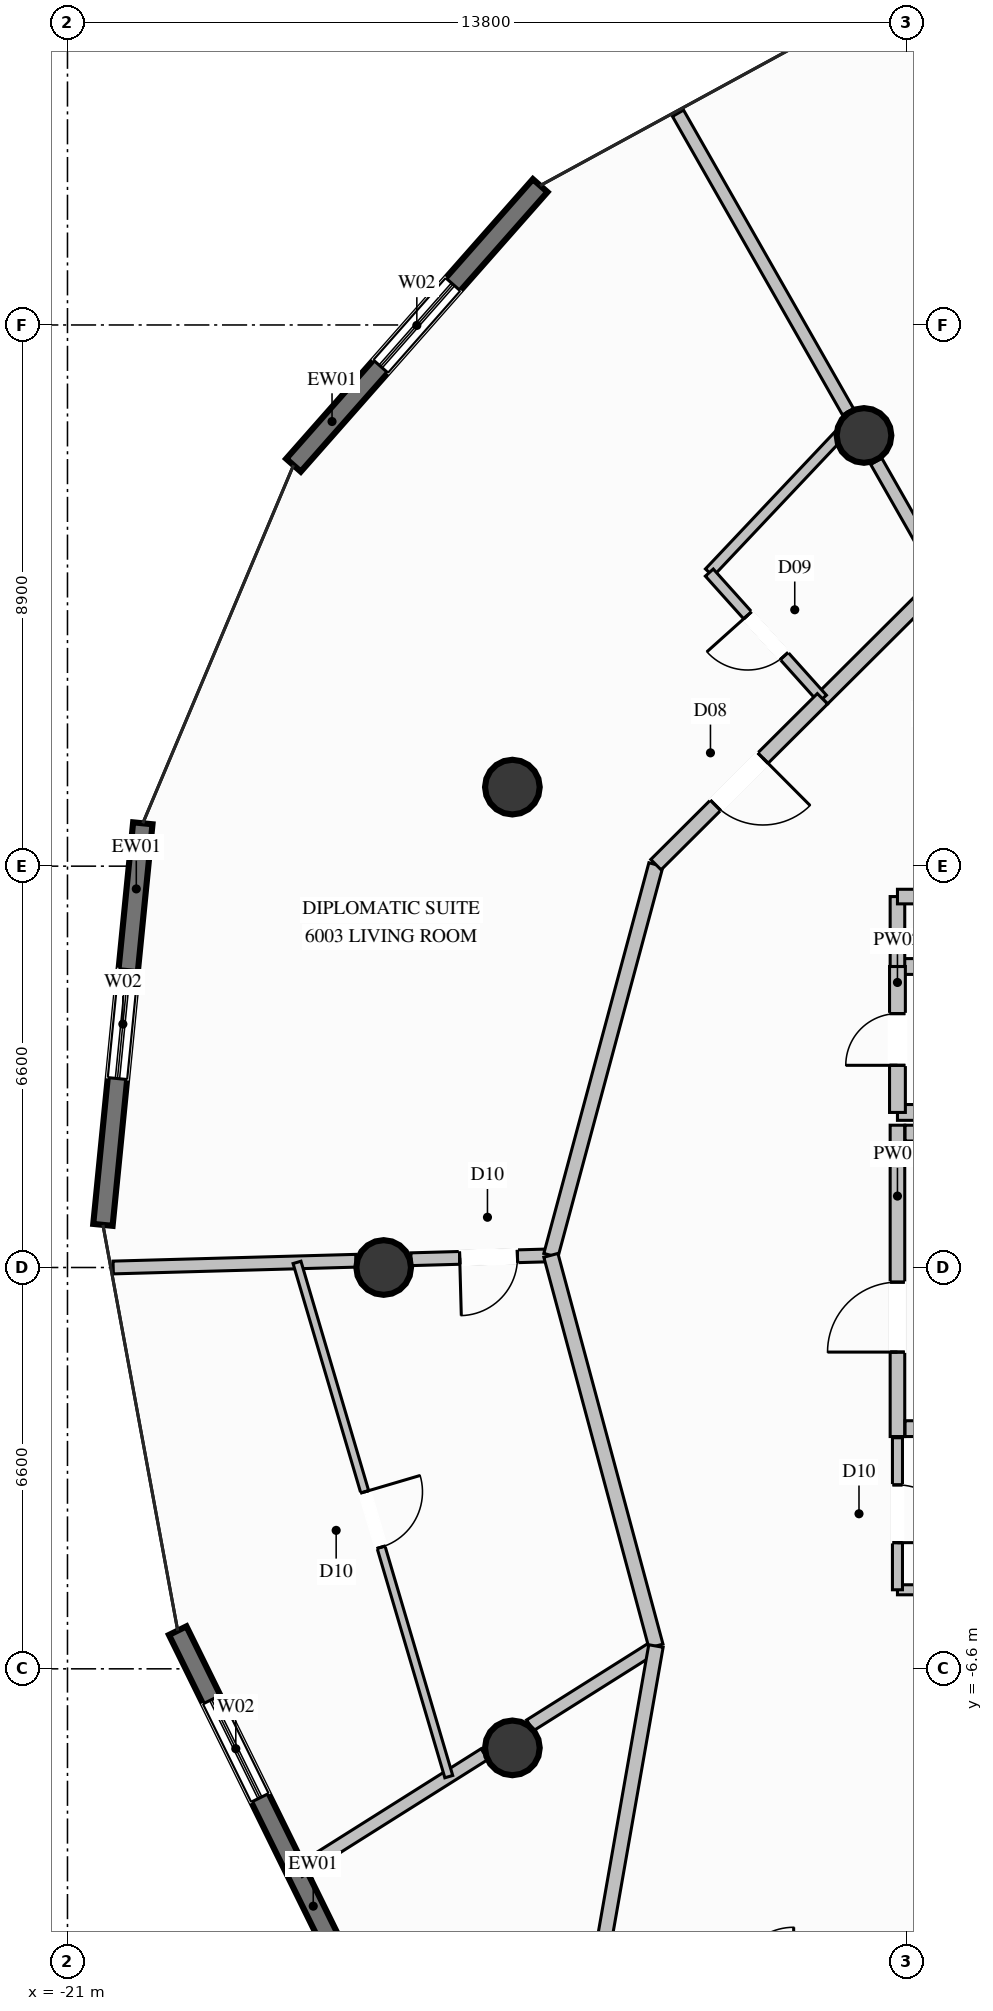
"""IFC4 building model, lengths in metres.
Left out: names, types, materials, properties, quantities, classifications, styles, units other than length and angle.
Written with IfcOpenShell. Run it as: python <this file> out.ifc"""

import sys

from ifc_helpers import new_model, si_unit, direction, frame, frame_2d, origin, origin_2d, place, context, subcontext, project, spatial, rectangle, circle, extrude, element, fill, save


model = new_model("IFC4")
c1 = context("Model", 3, precision=1e-05, world=origin(), true_north=direction((0.0, 1.0)))
c2 = subcontext(c1, "Body", "Model", "MODEL_VIEW")
j1 = project(units=[si_unit("LENGTHUNIT", "METRE"), si_unit("PLANEANGLEUNIT", "RADIAN")], contexts=[c1])
p1 = place(None, origin())
s1 = spatial("IfcSite", under=j1, at=p1, CompositionType="ELEMENT")
p2 = place(p1, origin())
s2 = spatial("IfcBuilding", under=s1, at=p2, CompositionType="ELEMENT")
p3 = place(p2, frame((0.0, 0.0, 223.6)))
s3 = spatial("IfcBuildingStorey", under=s2, at=p3, CompositionType="ELEMENT", Elevation=223.6)
for number, where, z_axis, x_axis in (
    (1, (-7.9, 13.683, 0.0), (0.0, 0.0, 1.0), (1.0, 0.0, 0.0)),
    (2, (-13.683, 7.9, 0.0), (0.0, 0.0, 1.0), (1.0, 0.0, 0.0)),
    (3, (-15.8, 0.0, 0.0), (0.0, 0.0, 1.0), (1.0, 0.0, 0.0)),
    (4, (-13.683, -7.9, 0.0), (0.0, 0.0, 1.0), (1.0, 0.0, 0.0)),
):
    element("IfcColumn", number, at=place(p3, frame(where, z_axis=z_axis, x_axis=x_axis)), inside=s3, PredefinedType="COLUMN", context=c2, shape_type="SweptSolid", body=[
        extrude(circle(Radius=0.45, at=origin_2d()), origin(), (0.0, 0.0, 1.0), 3.6),
    ])
p4 = place(p3, frame((-17.283, 13.194, 0.0), z_axis=(0.0, 0.0, 1.0), x_axis=(0.661613735925, 0.749844826905, 0.0)))
e5 = element("IfcWall", 5, at=p4, inside=s3, PredefinedType="SOLIDWALL", context=c2, shape_type="SweptSolid", body=[
    extrude(rectangle(XDim=6.132, YDim=0.32, at=frame_2d((3.066, 0.0))), origin(), (0.0, 0.0, 1.0), 3.36),
])
p5 = place(p4, frame((2.166, 0.0, 0.35)))
e6 = element("IfcOpeningElement", 6, at=p5, cuts=e5, PredefinedType="OPENING", context=c2, shape_type="SweptSolid", body=[
    extrude(rectangle(XDim=1.8, YDim=2.6, at=frame_2d((0.9, 1.3))), frame((0.0, 0.17, 0.0), z_axis=(0.0, -1.0, 0.0), x_axis=(1.0, 0.0, 0.0)), (0.0, 0.0, 1.0), 0.34),
])
p6 = place(p3, frame((-20.417, 0.701, 0.0), z_axis=(0.0, 0.0, 1.0), x_axis=(0.098848078175, 0.995102536144, 0.0)))
e7 = element("IfcWall", 7, at=p6, inside=s3, PredefinedType="SOLIDWALL", context=c2, shape_type="SweptSolid", body=[
    extrude(rectangle(XDim=6.636, YDim=0.32, at=frame_2d((3.318, 0.0))), origin(), (0.0, 0.0, 1.0), 3.36),
])
p7 = place(p6, frame((2.418, 0.0, 0.35)))
e8 = element("IfcOpeningElement", 8, at=p7, cuts=e7, PredefinedType="OPENING", context=c2, shape_type="SweptSolid", body=[
    extrude(rectangle(XDim=1.8, YDim=2.6, at=frame_2d((0.9, 1.3))), frame((0.0, 0.17, 0.0), z_axis=(0.0, -1.0, 0.0), x_axis=(1.0, 0.0, 0.0)), (0.0, 0.0, 1.0), 0.34),
])
p8 = place(p3, frame((-16.192, -12.06, 0.0), z_axis=(0.0, 0.0, 1.0), x_axis=(-0.441432699622, 0.897294361792, 0.0)))
e9 = element("IfcWall", 9, at=p8, inside=s3, PredefinedType="SOLIDWALL", context=c2, shape_type="SweptSolid", body=[
    extrude(rectangle(XDim=6.785, YDim=0.32, at=frame_2d((3.393, 0.0))), origin(), (0.0, 0.0, 1.0), 3.36),
])
p9 = place(p8, frame((3.721, 0.0, 0.35)))
e10 = element("IfcOpeningElement", 10, at=p9, cuts=e9, PredefinedType="OPENING", context=c2, shape_type="SweptSolid", body=[
    extrude(rectangle(XDim=1.8, YDim=2.6, at=frame_2d((0.9, 1.3))), frame((0.0, 0.17, 0.0), z_axis=(0.0, -1.0, 0.0), x_axis=(1.0, 0.0, 0.0)), (0.0, 0.0, 1.0), 0.34),
])
p10 = place(p3, frame((-7.35, -2.78, 0.0), z_axis=(0.0, 0.0, 1.0), x_axis=(0.0, 1.0, 0.0)))
e11 = element("IfcWall", 11, at=p10, inside=s3, PredefinedType="PARTITIONING", context=c2, shape_type="SweptSolid", body=[
    extrude(rectangle(XDim=5.12, YDim=0.24, at=frame_2d((2.56, 0.0))), origin(), (0.0, 0.0, 1.0), 2.445),
])
p11 = place(p10, frame((1.389, 0.0, 0.0)))
e12 = element("IfcOpeningElement", 12, at=p11, cuts=e11, PredefinedType="OPENING", context=c2, shape_type="SweptSolid", body=[
    extrude(rectangle(XDim=1.15, YDim=2.2, at=frame_2d((0.575, 1.1))), frame((0.0, 0.13, 0.0), z_axis=(0.0, -1.0, 0.0), x_axis=(1.0, 0.0, 0.0)), (0.0, 0.0, 1.0), 0.26),
])
p12 = place(p3, frame((-7.225, -2.65, 0.0), z_axis=(0.0, 0.0, 1.0), x_axis=(1.0, 0.0, 0.0)))
e13 = element("IfcWall", 13, at=p12, inside=s3, PredefinedType="PARTITIONING", context=c2, shape_type="SweptSolid", body=[
    extrude(rectangle(XDim=3.095, YDim=0.26, at=frame_2d((1.548, 0.0))), origin(), (0.0, 0.0, 1.0), 3.36),
])
p13 = place(p3, frame((-7.225, 2.21, 0.0), z_axis=(0.0, 0.0, 1.0), x_axis=(1.0, 0.0, 0.0)))
e14 = element("IfcWall", 14, at=p13, inside=s3, PredefinedType="PARTITIONING", context=c2, shape_type="SweptSolid", body=[
    extrude(rectangle(XDim=0.875, YDim=0.26, at=frame_2d((0.438, 0.0))), origin(), (0.0, 0.0, 1.0), 3.36),
])
for number, where, z_axis, x_axis in (
    (15, (-7.35, 4.95, 0.0), (0.0, 0.0, 1.0), (1.0, 0.0, 0.0)),
    (16, (-7.35, 2.55, 0.0), (0.0, 0.0, 1.0), (1.0, 0.0, 0.0)),
):
    element("IfcWall", number, at=place(p3, frame(where, z_axis=z_axis, x_axis=x_axis)), inside=s3, PredefinedType="PARTITIONING", context=c2, shape_type="SweptSolid", body=[
        extrude(rectangle(XDim=0.93, YDim=0.26, at=frame_2d((0.465, 0.0))), origin(), (0.0, 0.0, 1.0), 3.36),
    ])
p14 = place(p3, frame((-7.35, 2.55, 0.0), z_axis=(0.0, 0.0, 1.0), x_axis=(0.0, 1.0, 0.0)))
e17 = element("IfcWall", 17, at=p14, inside=s3, PredefinedType="PARTITIONING", context=c2, shape_type="SweptSolid", body=[
    extrude(rectangle(XDim=2.4, YDim=0.26, at=frame_2d((1.2, 0.0))), origin(), (0.0, 0.0, 1.0), 2.445),
])
p15 = place(p14, frame((0.775, 0.0, 0.0)))
e18 = element("IfcOpeningElement", 18, at=p15, cuts=e17, PredefinedType="OPENING", context=c2, shape_type="SweptSolid", body=[
    extrude(rectangle(XDim=0.85, YDim=2.05, at=frame_2d((0.425, 1.025))), frame((0.0, 0.14, 0.0), z_axis=(0.0, -1.0, 0.0), x_axis=(1.0, 0.0, 0.0)), (0.0, 0.0, 1.0), 0.28),
])
p16 = place(p3, frame((-7.35, 4.95, 0.0), z_axis=(0.0, 0.0, 1.0), x_axis=(0.0, 1.0, 0.0)))
e19 = element("IfcWall", 19, at=p16, inside=s3, PredefinedType="PARTITIONING", context=c2, shape_type="SweptSolid", body=[
    extrude(rectangle(XDim=1.15, YDim=0.24, at=frame_2d((0.575, 0.0))), origin(), (0.0, 0.0, 1.0), 2.445),
])
p17 = place(p3, frame((-7.35, 6.1, 0.0), z_axis=(0.0, 0.0, 1.0), x_axis=(1.0, 0.0, 0.0)))
e20 = element("IfcWall", 20, at=p17, inside=s3, PredefinedType="PARTITIONING", context=c2, shape_type="SweptSolid", body=[
    extrude(rectangle(XDim=0.85, YDim=0.24, at=frame_2d((0.425, 0.0))), origin(), (0.0, 0.0, 1.0), 2.801),
])
p18 = place(p3, frame((-7.35, -5.3, 0.0), z_axis=(0.0, 0.0, 1.0), x_axis=(1.0, 0.0, 0.0)))
e21 = element("IfcWall", 21, at=p18, inside=s3, PredefinedType="PARTITIONING", context=c2, shape_type="SweptSolid", body=[
    extrude(rectangle(XDim=1.5, YDim=0.165, at=frame_2d((0.75, 0.0))), origin(), (0.0, 0.0, 1.0), 2.445),
])
p19 = place(p3, frame((-7.35, -2.8, 0.0), z_axis=(0.0, 0.0, 1.0), x_axis=(0.0, -1.0, 0.0)))
e22 = element("IfcWall", 22, at=p19, inside=s3, PredefinedType="PARTITIONING", context=c2, shape_type="SweptSolid", body=[
    extrude(rectangle(XDim=2.5, YDim=0.165, at=frame_2d((1.25, 0.0))), origin(), (0.0, 0.0, 1.0), 3.36),
])
p20 = place(p19, frame((0.775, 0.0, 0.0)))
e23 = element("IfcOpeningElement", 23, at=p20, cuts=e22, PredefinedType="OPENING", context=c2, shape_type="SweptSolid", body=[
    extrude(rectangle(XDim=0.95, YDim=2.1, at=frame_2d((0.475, 1.05))), frame((0.0, 0.093, 0.0), z_axis=(0.0, -1.0, 0.0), x_axis=(1.0, 0.0, 0.0)), (0.0, 0.0, 1.0), 0.185),
])
p21 = place(p3, frame((-6.6, 11.328, 0.0), z_axis=(0.0, 0.0, 1.0), x_axis=(-0.494753305644, 0.869033466878, 0.0)))
e24 = element("IfcWall", 24, at=p21, inside=s3, PredefinedType="PARTITIONING", context=c2, shape_type="SweptSolid", body=[
    extrude(rectangle(XDim=2.221, YDim=0.21, at=frame_2d((1.11, 0.0))), origin(), (0.0, 0.0, 1.0), 2.801),
])
p22 = place(p3, frame((-8.163, 14.073, 0.0), z_axis=(0.0, 0.0, 1.0), x_axis=(-0.494909777101, 0.868944366763, 0.0)))
e25 = element("IfcWall", 25, at=p22, inside=s3, PredefinedType="PARTITIONING", context=c2, shape_type="SweptSolid", body=[
    extrude(rectangle(XDim=5.649, YDim=0.21, at=frame_2d((2.825, 0.0))), origin(), (0.0, 0.0, 1.0), 3.36),
])
p23 = place(p3, frame((-13.05, 0.2, 0.0), z_axis=(0.0, 0.0, 1.0), x_axis=(-0.999613520241, -0.027799463146, 0.0)))
e26 = element("IfcWall", 26, at=p23, inside=s3, PredefinedType="PARTITIONING", context=c2, shape_type="SweptSolid", body=[
    extrude(rectangle(XDim=2.301, YDim=0.21, at=frame_2d((1.15, 0.0))), origin(), (0.0, 0.0, 1.0), 3.36),
])
p24 = place(p23, frame((0.55, 0.0, 0.0)))
e27 = element("IfcOpeningElement", 27, at=p24, cuts=e26, PredefinedType="OPENING", context=c2, shape_type="SweptSolid", body=[
    extrude(rectangle(XDim=0.95, YDim=2.1, at=frame_2d((0.475, 1.05))), frame((0.0, 0.115, 0.0), z_axis=(0.0, -1.0, 0.0), x_axis=(1.0, 0.0, 0.0)), (0.0, 0.0, 1.0), 0.23),
])
p25 = place(p3, frame((-16.257, 0.111, 0.0), z_axis=(0.0, 0.0, 1.0), x_axis=(-0.999612863233, -0.027823077798, 0.0)))
e28 = element("IfcWall", 28, at=p25, inside=s3, PredefinedType="PARTITIONING", context=c2, shape_type="SweptSolid", body=[
    extrude(rectangle(XDim=3.992, YDim=0.21, at=frame_2d((1.996, 0.0))), origin(), (0.0, 0.0, 1.0), 3.36),
])
p26 = place(p3, frame((-11.322, -6.225, 0.0), z_axis=(0.0, 0.0, 1.0), x_axis=(-0.846059580186, -0.533088348001, 0.0)))
e29 = element("IfcWall", 29, at=p26, inside=s3, PredefinedType="PARTITIONING", context=c2, shape_type="SweptSolid", body=[
    extrude(rectangle(XDim=2.448, YDim=0.21, at=frame_2d((1.224, 0.0))), origin(), (0.0, 0.0, 1.0), 2.801),
])
p27 = place(p3, frame((-14.142, -8.003, 0.0), z_axis=(0.0, 0.0, 1.0), x_axis=(-0.84595942636, -0.533247268115, 0.0)))
e30 = element("IfcWall", 30, at=p27, inside=s3, PredefinedType="PARTITIONING", context=c2, shape_type="SweptSolid", body=[
    extrude(rectangle(XDim=3.61, YDim=0.21, at=frame_2d((1.805, 0.0))), origin(), (0.0, 0.0, 1.0), 3.36),
])
p28 = place(p3, frame((-6.6, 11.328, 0.0), z_axis=(0.0, 0.0, 1.0), x_axis=(-0.708544738437, -0.705665893772, 0.0)))
e31 = element("IfcWall", 31, at=p28, inside=s3, PredefinedType="PARTITIONING", context=c2, shape_type="SweptSolid", body=[
    extrude(rectangle(XDim=2.799, YDim=0.24, at=frame_2d((1.399, 0.0))), origin(), (0.0, 0.0, 1.0), 3.36),
])
p29 = place(p3, frame((-8.082, 13.93, 0.0), z_axis=(0.0, 0.0, 1.0), x_axis=(-0.686486009921, -0.727143010819, 0.0)))
e32 = element("IfcWall", 32, at=p29, inside=s3, PredefinedType="PLUMBINGWALL", context=c2, shape_type="SweptSolid", body=[
    extrude(rectangle(XDim=3.441, YDim=0.175, at=frame_2d((1.72, 0.0))), origin(), (0.0, 0.0, 1.0), 2.929),
])
p30 = place(p3, frame((-8.583, 9.353, 0.0), z_axis=(0.0, 0.0, 1.0), x_axis=(-0.667700723626, 0.74442981111, 0.0)))
e33 = element("IfcWall", 33, at=p30, inside=s3, PredefinedType="PLUMBINGWALL", context=c2, shape_type="SweptSolid", body=[
    extrude(rectangle(XDim=2.787, YDim=0.175, at=frame_2d((1.394, 0.0))), origin(), (0.0, 0.0, 1.0), 3.36),
])
p31 = place(p30, frame((0.944, 0.0, 0.0)))
e34 = element("IfcOpeningElement", 34, at=p31, cuts=e33, PredefinedType="OPENING", context=c2, shape_type="SweptSolid", body=[
    extrude(rectangle(XDim=0.9, YDim=2.1, at=frame_2d((0.45, 1.05))), frame((0.0, 0.098, 0.0), z_axis=(0.0, -1.0, 0.0), x_axis=(1.0, 0.0, 0.0)), (0.0, 0.0, 1.0), 0.195),
])
p32 = place(p3, frame((-11.322, 6.625, 0.0), z_axis=(0.0, 0.0, 1.0), x_axis=(-0.259722121469, -0.965683395125, 0.0)))
e35 = element("IfcWall", 35, at=p32, inside=s3, PredefinedType="PARTITIONING", context=c2, shape_type="SweptSolid", body=[
    extrude(rectangle(XDim=6.653, YDim=0.24, at=frame_2d((3.327, 0.0))), origin(), (0.0, 0.0, 1.0), 3.36),
])
p33 = place(p3, frame((-8.583, 9.353, 0.0), z_axis=(0.0, 0.0, 1.0), x_axis=(-0.70852632163, -0.70568438523, 0.0)))
e36 = element("IfcWall", 36, at=p33, inside=s3, PredefinedType="PARTITIONING", context=c2, shape_type="SweptSolid", body=[
    extrude(rectangle(XDim=3.866, YDim=0.24, at=frame_2d((1.933, 0.0))), origin(), (0.0, 0.0, 1.0), 3.36),
])
p34 = place(p33, frame((1.383, 0.0, 0.0)))
e37 = element("IfcOpeningElement", 37, at=p34, cuts=e36, PredefinedType="OPENING", context=c2, shape_type="SweptSolid", body=[
    extrude(rectangle(XDim=1.1, YDim=2.3, at=frame_2d((0.55, 1.15))), frame((0.0, 0.13, 0.0), z_axis=(0.0, -1.0, 0.0), x_axis=(1.0, 0.0, 0.0)), (0.0, 0.0, 1.0), 0.26),
])
p35 = place(p3, frame((-13.05, 0.2, 0.0), z_axis=(0.0, 0.0, 1.0), x_axis=(0.259722121469, -0.965683395125, 0.0)))
e38 = element("IfcWall", 38, at=p35, inside=s3, PredefinedType="PARTITIONING", context=c2, shape_type="SweptSolid", body=[
    extrude(rectangle(XDim=6.653, YDim=0.24, at=frame_2d((3.327, 0.0))), origin(), (0.0, 0.0, 1.0), 3.36),
])
p36 = place(p3, frame((-17.225, 0.084, 0.0), z_axis=(0.0, 0.0, 1.0), x_axis=(0.283077593479, -0.959097010771, 0.0)))
e39 = element("IfcWall", 39, at=p36, inside=s3, PredefinedType="PARTITIONING", context=c2, shape_type="SweptSolid", body=[
    extrude(rectangle(XDim=8.818, YDim=0.135, at=frame_2d((4.409, 0.0))), origin(), (0.0, 0.0, 1.0), 3.36),
])
p37 = place(p36, frame((3.934, 0.0, 0.0)))
e40 = element("IfcOpeningElement", 40, at=p37, cuts=e39, PredefinedType="OPENING", context=c2, shape_type="SweptSolid", body=[
    extrude(rectangle(XDim=0.95, YDim=2.1, at=frame_2d((0.475, 1.05))), frame((0.0, 0.078, 0.0), z_axis=(0.0, -1.0, 0.0), x_axis=(1.0, 0.0, 0.0)), (0.0, 0.0, 1.0), 0.155),
])
p38 = place(p3, frame((-11.322, -6.225, 0.0), z_axis=(0.0, 0.0, 1.0), x_axis=(-0.172793604918, -0.984958054995, 0.0)))
e41 = element("IfcWall", 41, at=p38, inside=s3, PredefinedType="PARTITIONING", context=c2, shape_type="SweptSolid", body=[
    extrude(rectangle(XDim=5.66, YDim=0.24, at=frame_2d((2.83, 0.0))), origin(), (0.0, 0.0, 1.0), 3.36),
])
p39 = place(p5, origin())
e42 = element("IfcWindow", 42, at=p39, inside=s3, PartitioningType="SINGLE_PANEL", PredefinedType="WINDOW", context=c2, shape_type="SweptSolid", body=[
    extrude(rectangle(XDim=1.8, YDim=2.6, at=frame_2d((0.9, 1.3))), frame((0.0, 0.03, 0.0), z_axis=(0.0, -1.0, 0.0), x_axis=(1.0, 0.0, 0.0)), (0.0, 0.0, 1.0), 0.06),
])
fill(e6, e42)
p40 = place(p7, origin())
e43 = element("IfcWindow", 43, at=p40, inside=s3, PartitioningType="SINGLE_PANEL", PredefinedType="WINDOW", context=c2, shape_type="SweptSolid", body=[
    extrude(rectangle(XDim=1.8, YDim=2.6, at=frame_2d((0.9, 1.3))), frame((0.0, 0.03, 0.0), z_axis=(0.0, -1.0, 0.0), x_axis=(1.0, 0.0, 0.0)), (0.0, 0.0, 1.0), 0.06),
])
fill(e8, e43)
p41 = place(p9, origin())
e44 = element("IfcWindow", 44, at=p41, inside=s3, PartitioningType="SINGLE_PANEL", PredefinedType="WINDOW", context=c2, shape_type="SweptSolid", body=[
    extrude(rectangle(XDim=1.8, YDim=2.6, at=frame_2d((0.9, 1.3))), frame((0.0, 0.03, 0.0), z_axis=(0.0, -1.0, 0.0), x_axis=(1.0, 0.0, 0.0)), (0.0, 0.0, 1.0), 0.06),
])
fill(e10, e44)
p42 = place(p11, origin())
e45 = element("IfcDoor", 45, at=p42, inside=s3, OperationType="SINGLE_SWING_LEFT", PredefinedType="DOOR", context=c2, shape_type="SweptSolid", body=[
    extrude(rectangle(XDim=1.15, YDim=2.2, at=frame_2d((0.575, 1.1))), frame((0.0, 0.025, 0.0), z_axis=(0.0, -1.0, 0.0), x_axis=(1.0, 0.0, 0.0)), (0.0, 0.0, 1.0), 0.05),
])
fill(e12, e45)
p43 = place(p15, origin())
e46 = element("IfcDoor", 46, at=p43, inside=s3, OperationType="SINGLE_SWING_LEFT", PredefinedType="DOOR", context=c2, shape_type="SweptSolid", body=[
    extrude(rectangle(XDim=0.85, YDim=2.05, at=frame_2d((0.425, 1.025))), frame((0.0, 0.025, 0.0), z_axis=(0.0, -1.0, 0.0), x_axis=(1.0, 0.0, 0.0)), (0.0, 0.0, 1.0), 0.05),
])
fill(e18, e46)
p44 = place(p20, origin())
e47 = element("IfcDoor", 47, at=p44, inside=s3, OperationType="SINGLE_SWING_RIGHT", PredefinedType="DOOR", context=c2, shape_type="SweptSolid", body=[
    extrude(rectangle(XDim=0.95, YDim=2.1, at=frame_2d((0.475, 1.05))), frame((0.0, 0.025, 0.0), z_axis=(0.0, -1.0, 0.0), x_axis=(1.0, 0.0, 0.0)), (0.0, 0.0, 1.0), 0.05),
])
fill(e23, e47)
p45 = place(p31, origin())
e48 = element("IfcDoor", 48, at=p45, inside=s3, OperationType="SINGLE_SWING_RIGHT", PredefinedType="DOOR", context=c2, shape_type="SweptSolid", body=[
    extrude(rectangle(XDim=0.9, YDim=2.1, at=frame_2d((0.45, 1.05))), frame((0.0, 0.025, 0.0), z_axis=(0.0, -1.0, 0.0), x_axis=(1.0, 0.0, 0.0)), (0.0, 0.0, 1.0), 0.05),
])
fill(e34, e48)
p46 = place(p34, origin())
e49 = element("IfcDoor", 49, at=p46, inside=s3, OperationType="SINGLE_SWING_LEFT", PredefinedType="DOOR", context=c2, shape_type="SweptSolid", body=[
    extrude(rectangle(XDim=1.1, YDim=2.3, at=frame_2d((0.55, 1.15))), frame((0.0, 0.025, 0.0), z_axis=(0.0, -1.0, 0.0), x_axis=(1.0, 0.0, 0.0)), (0.0, 0.0, 1.0), 0.05),
])
fill(e37, e49)
p47 = place(p24, origin())
e50 = element("IfcDoor", 50, at=p47, inside=s3, OperationType="SINGLE_SWING_RIGHT", PredefinedType="DOOR", context=c2, shape_type="SweptSolid", body=[
    extrude(rectangle(XDim=0.95, YDim=2.1, at=frame_2d((0.475, 1.05))), frame((0.0, 0.025, 0.0), z_axis=(0.0, -1.0, 0.0), x_axis=(1.0, 0.0, 0.0)), (0.0, 0.0, 1.0), 0.05),
])
fill(e27, e50)
p48 = place(p37, origin())
e51 = element("IfcDoor", 51, at=p48, inside=s3, OperationType="SINGLE_SWING_LEFT", PredefinedType="DOOR", context=c2, shape_type="SweptSolid", body=[
    extrude(rectangle(XDim=0.95, YDim=2.1, at=frame_2d((0.475, 1.05))), frame((0.0, 0.025, 0.0), z_axis=(0.0, -1.0, 0.0), x_axis=(1.0, 0.0, 0.0)), (0.0, 0.0, 1.0), 0.05),
])
fill(e40, e51)
save(model, sys.argv[1])
